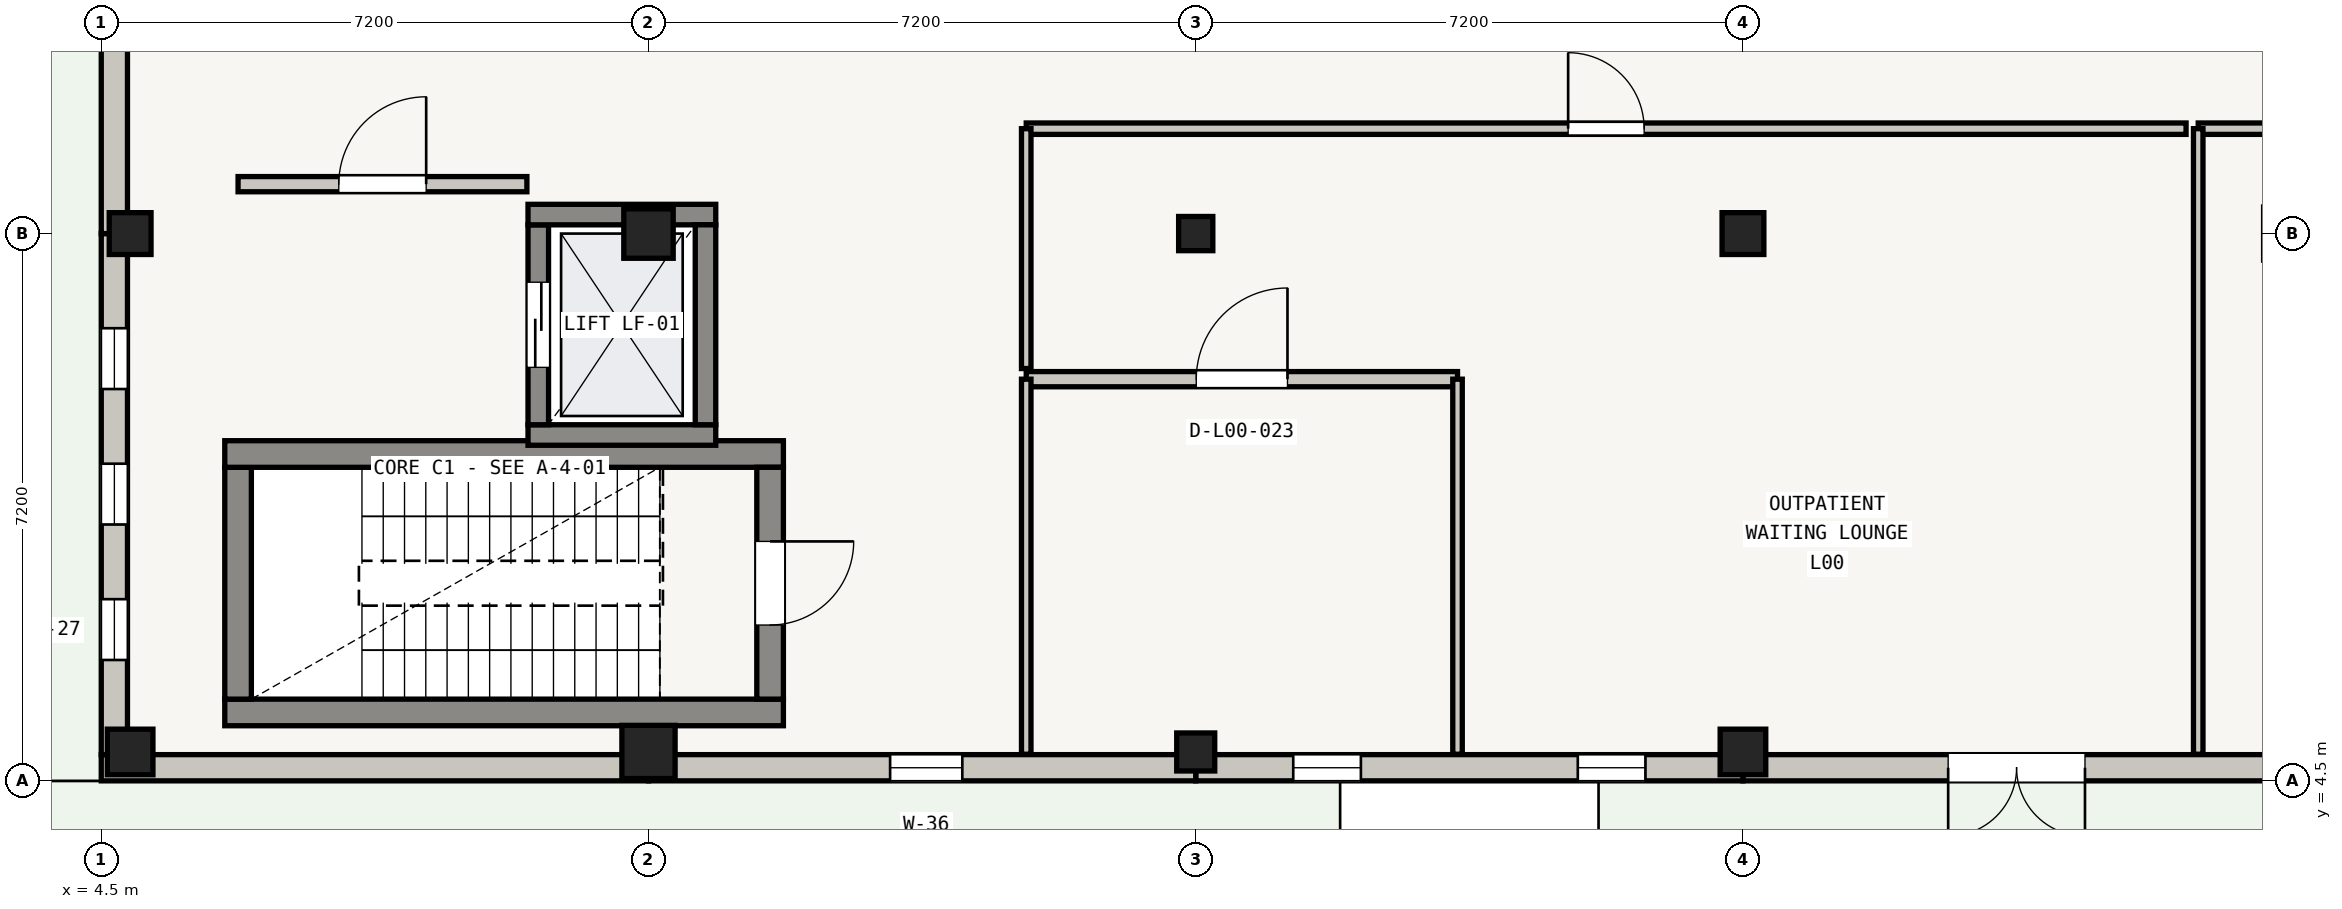
"""IFC4 building model, lengths in metres.
Left out: names, types, materials, properties, quantities, classifications, styles, units other than length and angle.
Written with IfcOpenShell. Run it as: python <this file> out.ifc"""

import sys

from ifc_helpers import new_model, si_unit, direction, frame, frame_2d, origin, origin_2d, place, context, subcontext, project, spatial, rectangle, extrude, element, fill, save


model = new_model("IFC4")
c1 = context("Model", 3, precision=1e-05, world=origin(), true_north=direction((0.0, 1.0)))
c2 = subcontext(c1, "Body", "Model", "MODEL_VIEW")
j1 = project(units=[si_unit("LENGTHUNIT", "METRE"), si_unit("PLANEANGLEUNIT", "RADIAN")], contexts=[c1])
p1 = place(None, origin())
s1 = spatial("IfcSite", under=j1, at=p1, CompositionType="ELEMENT")
p2 = place(p1, origin())
s2 = spatial("IfcBuilding", under=s1, at=p2, CompositionType="ELEMENT")
p3 = place(p2, origin())
s3 = spatial("IfcBuildingStorey", under=s2, at=p3, CompositionType="ELEMENT", Elevation=0.0)
p4 = place(p3, frame((4.88, 4.88, 0.0), z_axis=(0.0, 0.0, 1.0), x_axis=(1.0, 0.0, 0.0)))
e1 = element("IfcColumn", 1, at=p4, inside=s3, PredefinedType="COLUMN", context=c2, shape_type="SweptSolid", body=[
    extrude(rectangle(XDim=0.6, YDim=0.6, at=origin_2d()), origin(), (0.0, 0.0, 1.0), 4.22),
])
p5 = place(p3, frame((4.88, 11.7, 0.0), z_axis=(0.0, 0.0, 1.0), x_axis=(1.0, 0.0, 0.0)))
e2 = element("IfcColumn", 2, at=p5, inside=s3, PredefinedType="COLUMN", context=c2, shape_type="SweptSolid", body=[
    extrude(rectangle(XDim=0.55, YDim=0.55, at=origin_2d()), origin(), (0.0, 0.0, 1.0), 4.22),
])
p6 = place(p3, frame((11.7, 4.88, 0.0), z_axis=(0.0, 0.0, 1.0), x_axis=(1.0, 0.0, 0.0)))
e3 = element("IfcColumn", 3, at=p6, inside=s3, PredefinedType="COLUMN", context=c2, shape_type="SweptSolid", body=[
    extrude(rectangle(XDim=0.7, YDim=0.7, at=origin_2d()), origin(), (0.0, 0.0, 1.0), 4.22),
])
p7 = place(p3, frame((11.7, 11.7, 0.0), z_axis=(0.0, 0.0, 1.0), x_axis=(1.0, 0.0, 0.0)))
e4 = element("IfcColumn", 4, at=p7, inside=s3, PredefinedType="COLUMN", context=c2, shape_type="SweptSolid", body=[
    extrude(rectangle(XDim=0.65, YDim=0.65, at=origin_2d()), origin(), (0.0, 0.0, 1.0), 4.22),
])
p8 = place(p3, frame((18.9, 4.88, 0.0), z_axis=(0.0, 0.0, 1.0), x_axis=(1.0, 0.0, 0.0)))
e5 = element("IfcColumn", 5, at=p8, inside=s3, PredefinedType="COLUMN", context=c2, shape_type="SweptSolid", body=[
    extrude(rectangle(XDim=0.5, YDim=0.5, at=origin_2d()), origin(), (0.0, 0.0, 1.0), 4.22),
])
p9 = place(p3, frame((18.9, 11.7, 0.0), z_axis=(0.0, 0.0, 1.0), x_axis=(1.0, 0.0, 0.0)))
e6 = element("IfcColumn", 6, at=p9, inside=s3, PredefinedType="COLUMN", context=c2, shape_type="SweptSolid", body=[
    extrude(rectangle(XDim=0.45, YDim=0.45, at=origin_2d()), origin(), (0.0, 0.0, 1.0), 4.22),
])
p10 = place(p3, frame((26.1, 4.88, 0.0), z_axis=(0.0, 0.0, 1.0), x_axis=(1.0, 0.0, 0.0)))
e7 = element("IfcColumn", 7, at=p10, inside=s3, PredefinedType="COLUMN", context=c2, shape_type="SweptSolid", body=[
    extrude(rectangle(XDim=0.6, YDim=0.6, at=origin_2d()), origin(), (0.0, 0.0, 1.0), 4.22),
])
p11 = place(p3, frame((26.1, 11.7, 0.0), z_axis=(0.0, 0.0, 1.0), x_axis=(1.0, 0.0, 0.0)))
e8 = element("IfcColumn", 8, at=p11, inside=s3, PredefinedType="COLUMN", context=c2, shape_type="SweptSolid", body=[
    extrude(rectangle(XDim=0.55, YDim=0.55, at=origin_2d()), origin(), (0.0, 0.0, 1.0), 4.22),
])
p12 = place(p3, frame((33.3, 4.673, 0.0), z_axis=(0.0, 0.0, 1.0), x_axis=(-1.0, 0.0, 0.0)))
e9 = element("IfcWall", 9, at=p12, inside=s3, PredefinedType="SOLIDWALL", context=c2, shape_type="SweptSolid", body=[
    extrude(rectangle(XDim=7.2, YDim=0.345, at=frame_2d((3.6, 0.0))), origin(), (0.0, 0.0, 1.0), 3.555),
])
p13 = place(p12, frame((2.7, 0.0, 0.0)))
e10 = element("IfcOpeningElement", 10, at=p13, cuts=e9, PredefinedType="OPENING", context=c2, shape_type="SweptSolid", body=[
    extrude(rectangle(XDim=1.8, YDim=2.1, at=frame_2d((0.9, 1.05))), frame((0.0, 0.172, 0.0), z_axis=(0.0, -1.0, 0.0), x_axis=(1.0, 0.0, 0.0)), (0.0, 0.0, 1.0), 0.345),
])
p14 = place(p3, frame((26.1, 4.673, 0.0), z_axis=(0.0, 0.0, 1.0), x_axis=(-1.0, 0.0, 0.0)))
e11 = element("IfcWall", 11, at=p14, inside=s3, PredefinedType="SOLIDWALL", context=c2, shape_type="SweptSolid", body=[
    extrude(rectangle(XDim=7.2, YDim=0.345, at=frame_2d((3.6, 0.0))), origin(), (0.0, 0.0, 1.0), 3.555),
])
p15 = place(p14, frame((1.283, 0.0, 0.55)))
e12 = element("IfcOpeningElement", 12, at=p15, cuts=e11, PredefinedType="OPENING", context=c2, shape_type="SweptSolid", body=[
    extrude(rectangle(XDim=0.89, YDim=2.02, at=frame_2d((0.445, 1.01))), frame((0.0, 0.172, 0.0), z_axis=(0.0, -1.0, 0.0), x_axis=(1.0, 0.0, 0.0)), (0.0, 0.0, 1.0), 0.345),
])
p16 = place(p14, frame((5.027, 0.0, 0.55)))
e13 = element("IfcOpeningElement", 13, at=p16, cuts=e11, PredefinedType="OPENING", context=c2, shape_type="SweptSolid", body=[
    extrude(rectangle(XDim=0.89, YDim=2.02, at=frame_2d((0.445, 1.01))), frame((0.0, 0.172, 0.0), z_axis=(0.0, -1.0, 0.0), x_axis=(1.0, 0.0, 0.0)), (0.0, 0.0, 1.0), 0.345),
])
p17 = place(p3, frame((18.9, 4.673, 0.0), z_axis=(0.0, 0.0, 1.0), x_axis=(-1.0, 0.0, 0.0)))
e14 = element("IfcWall", 14, at=p17, inside=s3, PredefinedType="SOLIDWALL", context=c2, shape_type="SweptSolid", body=[
    extrude(rectangle(XDim=7.2, YDim=0.345, at=frame_2d((3.6, 0.0))), origin(), (0.0, 0.0, 1.0), 3.555),
])
p18 = place(p17, frame((3.071, 0.0, 0.55)))
e15 = element("IfcOpeningElement", 15, at=p18, cuts=e14, PredefinedType="OPENING", context=c2, shape_type="SweptSolid", body=[
    extrude(rectangle(XDim=0.95, YDim=2.02, at=frame_2d((0.475, 1.01))), frame((0.0, 0.172, 0.0), z_axis=(0.0, -1.0, 0.0), x_axis=(1.0, 0.0, 0.0)), (0.0, 0.0, 1.0), 0.345),
])
p19 = place(p3, frame((11.7, 4.673, 0.0), z_axis=(0.0, 0.0, 1.0), x_axis=(-1.0, 0.0, 0.0)))
e16 = element("IfcWall", 16, at=p19, inside=s3, PredefinedType="SOLIDWALL", context=c2, shape_type="SweptSolid", body=[
    extrude(rectangle(XDim=7.2, YDim=0.345, at=frame_2d((3.6, 0.0))), origin(), (0.0, 0.0, 1.0), 3.655),
])
p20 = place(p3, frame((4.673, 4.845, 0.0), z_axis=(0.0, 0.0, 1.0), x_axis=(0.0, 1.0, 0.0)))
e17 = element("IfcWall", 17, at=p20, inside=s3, PredefinedType="SOLIDWALL", context=c2, shape_type="SweptSolid", body=[
    extrude(rectangle(XDim=6.855, YDim=0.345, at=frame_2d((3.427, 0.0))), origin(), (0.0, 0.0, 1.0), 3.585),
])
p21 = place(p20, frame((1.245, 0.0, 0.55)))
e18 = element("IfcOpeningElement", 18, at=p21, cuts=e17, PredefinedType="OPENING", context=c2, shape_type="SweptSolid", body=[
    extrude(rectangle(XDim=0.8, YDim=1.8, at=frame_2d((0.4, 0.9))), frame((0.0, 0.172, 0.0), z_axis=(0.0, -1.0, 0.0), x_axis=(1.0, 0.0, 0.0)), (0.0, 0.0, 1.0), 0.345),
])
p22 = place(p20, frame((3.028, 0.0, 0.55)))
e19 = element("IfcOpeningElement", 19, at=p22, cuts=e17, PredefinedType="OPENING", context=c2, shape_type="SweptSolid", body=[
    extrude(rectangle(XDim=0.8, YDim=1.8, at=frame_2d((0.4, 0.9))), frame((0.0, 0.172, 0.0), z_axis=(0.0, -1.0, 0.0), x_axis=(1.0, 0.0, 0.0)), (0.0, 0.0, 1.0), 0.345),
])
p23 = place(p20, frame((4.81, 0.0, 0.55)))
e20 = element("IfcOpeningElement", 20, at=p23, cuts=e17, PredefinedType="OPENING", context=c2, shape_type="SweptSolid", body=[
    extrude(rectangle(XDim=0.8, YDim=1.8, at=frame_2d((0.4, 0.9))), frame((0.0, 0.172, 0.0), z_axis=(0.0, -1.0, 0.0), x_axis=(1.0, 0.0, 0.0)), (0.0, 0.0, 1.0), 0.345),
])
p24 = place(p3, frame((4.673, 11.7, 0.0), z_axis=(0.0, 0.0, 1.0), x_axis=(0.0, 1.0, 0.0)))
e21 = element("IfcWall", 21, at=p24, inside=s3, PredefinedType="SOLIDWALL", context=c2, shape_type="SweptSolid", body=[
    extrude(rectangle(XDim=7.2, YDim=0.345, at=frame_2d((3.6, 0.0))), origin(), (0.0, 0.0, 1.0), 3.585),
])
p25 = place(p24, frame((2.7, 0.0, 0.0)))
e22 = element("IfcOpeningElement", 22, at=p25, cuts=e21, PredefinedType="OPENING", context=c2, shape_type="SweptSolid", body=[
    extrude(rectangle(XDim=1.8, YDim=2.1, at=frame_2d((0.9, 1.05))), frame((0.0, 0.172, 0.0), z_axis=(0.0, -1.0, 0.0), x_axis=(1.0, 0.0, 0.0)), (0.0, 0.0, 1.0), 0.345),
])
p26 = place(p3, frame((13.475, 5.4, 0.0), z_axis=(0.0, 0.0, 1.0), x_axis=(-1.0, 0.0, 0.0)))
e23 = element("IfcWall", 23, at=p26, inside=s3, PredefinedType="SHEAR", context=c2, shape_type="SweptSolid", body=[
    extrude(rectangle(XDim=7.35, YDim=0.35, at=frame_2d((3.675, 0.0))), origin(), (0.0, 0.0, 1.0), 4.22),
])
p27 = place(p3, frame((6.3, 5.575, 0.0), z_axis=(0.0, 0.0, 1.0), x_axis=(0.0, 1.0, 0.0)))
e24 = element("IfcWall", 24, at=p27, inside=s3, PredefinedType="SHEAR", context=c2, shape_type="SweptSolid", body=[
    extrude(rectangle(XDim=3.05, YDim=0.35, at=frame_2d((1.525, 0.0))), origin(), (0.0, 0.0, 1.0), 4.22),
])
p28 = place(p3, frame((6.125, 8.8, 0.0), z_axis=(0.0, 0.0, 1.0), x_axis=(1.0, 0.0, 0.0)))
e25 = element("IfcWall", 25, at=p28, inside=s3, PredefinedType="SHEAR", context=c2, shape_type="SweptSolid", body=[
    extrude(rectangle(XDim=7.35, YDim=0.35, at=frame_2d((3.675, 0.0))), origin(), (0.0, 0.0, 1.0), 4.22),
])
p29 = place(p3, frame((13.3, 8.625, 0.0), z_axis=(0.0, 0.0, 1.0), x_axis=(0.0, -1.0, 0.0)))
e26 = element("IfcWall", 26, at=p29, inside=s3, PredefinedType="SHEAR", context=c2, shape_type="SweptSolid", body=[
    extrude(rectangle(XDim=3.05, YDim=0.35, at=frame_2d((1.525, 0.0))), origin(), (0.0, 0.0, 1.0), 4.22),
])
p30 = place(p29, frame((0.975, 0.0, 0.0)))
e27 = element("IfcOpeningElement", 27, at=p30, cuts=e26, PredefinedType="OPENING", context=c2, shape_type="SweptSolid", body=[
    extrude(rectangle(XDim=1.1, YDim=2.05, at=frame_2d((0.55, 1.025))), frame((0.0, 0.175, 0.0), z_axis=(0.0, -1.0, 0.0), x_axis=(1.0, 0.0, 0.0)), (0.0, 0.0, 1.0), 0.35),
])
p31 = place(p3, frame((12.585, 9.05, 0.0), z_axis=(0.0, 0.0, 1.0), x_axis=(-1.0, 0.0, 0.0)))
e28 = element("IfcWall", 28, at=p31, inside=s3, PredefinedType="SHEAR", context=c2, shape_type="SweptSolid", body=[
    extrude(rectangle(XDim=2.47, YDim=0.27, at=frame_2d((1.235, 0.0))), origin(), (0.0, 0.0, 1.0), 4.22),
])
p32 = place(p3, frame((10.25, 9.185, 0.0), z_axis=(0.0, 0.0, 1.0), x_axis=(0.0, 1.0, 0.0)))
e29 = element("IfcWall", 29, at=p32, inside=s3, PredefinedType="SHEAR", context=c2, shape_type="SweptSolid", body=[
    extrude(rectangle(XDim=2.63, YDim=0.27, at=frame_2d((1.315, 0.0))), origin(), (0.0, 0.0, 1.0), 4.22),
])
p33 = place(p32, frame((0.755, 0.0, 0.0)))
e30 = element("IfcOpeningElement", 30, at=p33, cuts=e29, PredefinedType="OPENING", context=c2, shape_type="SweptSolid", body=[
    extrude(rectangle(XDim=1.12, YDim=2.1, at=frame_2d((0.56, 1.05))), frame((0.0, 0.135, 0.0), z_axis=(0.0, -1.0, 0.0), x_axis=(1.0, 0.0, 0.0)), (0.0, 0.0, 1.0), 0.27),
])
p34 = place(p3, frame((10.115, 11.95, 0.0), z_axis=(0.0, 0.0, 1.0), x_axis=(1.0, 0.0, 0.0)))
e31 = element("IfcWall", 31, at=p34, inside=s3, PredefinedType="SHEAR", context=c2, shape_type="SweptSolid", body=[
    extrude(rectangle(XDim=2.47, YDim=0.27, at=frame_2d((1.235, 0.0))), origin(), (0.0, 0.0, 1.0), 4.22),
])
p35 = place(p3, frame((12.45, 11.815, 0.0), z_axis=(0.0, 0.0, 1.0), x_axis=(0.0, -1.0, 0.0)))
e32 = element("IfcWall", 32, at=p35, inside=s3, PredefinedType="SHEAR", context=c2, shape_type="SweptSolid", body=[
    extrude(rectangle(XDim=2.63, YDim=0.27, at=frame_2d((1.315, 0.0))), origin(), (0.0, 0.0, 1.0), 4.22),
])
p36 = place(p3, frame((6.3, 12.35, 0.0), z_axis=(0.0, 0.0, 1.0), x_axis=(1.0, 0.0, 0.0)))
e33 = element("IfcWall", 33, at=p36, inside=s3, PredefinedType="SOLIDWALL", context=c2, shape_type="SweptSolid", body=[
    extrude(rectangle(XDim=3.8, YDim=0.2, at=frame_2d((1.9, 0.0))), origin(), (0.0, 0.0, 1.0), 3.24),
])
p37 = place(p36, frame((1.325, 0.0, 0.0)))
e34 = element("IfcOpeningElement", 34, at=p37, cuts=e33, PredefinedType="OPENING", context=c2, shape_type="SweptSolid", body=[
    extrude(rectangle(XDim=1.15, YDim=2.05, at=frame_2d((0.575, 1.025))), frame((0.0, 0.1, 0.0), z_axis=(0.0, -1.0, 0.0), x_axis=(1.0, 0.0, 0.0)), (0.0, 0.0, 1.0), 0.2),
])
p38 = place(p3, frame((16.67, 9.784, 0.0), z_axis=(0.0, 0.0, 1.0), x_axis=(1.0, 0.0, 0.0)))
e35 = element("IfcWall", 35, at=p38, inside=s3, PredefinedType="SOLIDWALL", context=c2, shape_type="SweptSolid", body=[
    extrude(rectangle(XDim=5.675, YDim=0.2, at=frame_2d((2.837, 0.0))), origin(), (0.0, 0.0, 1.0), 3.24),
])
p39 = place(p38, frame((2.237, 0.0, 0.0)))
e36 = element("IfcOpeningElement", 36, at=p39, cuts=e35, PredefinedType="OPENING", context=c2, shape_type="SweptSolid", body=[
    extrude(rectangle(XDim=1.2, YDim=2.05, at=frame_2d((0.6, 1.025))), frame((0.0, 0.1, 0.0), z_axis=(0.0, -1.0, 0.0), x_axis=(1.0, 0.0, 0.0)), (0.0, 0.0, 1.0), 0.2),
])
for number, where, z_axis, x_axis in (
    (37, (22.344, 9.784, 0.0), (0.0, 0.0, 1.0), (0.0, -1.0, 0.0)),
    (38, (16.67, 4.85, 0.0), (0.0, 0.0, 1.0), (0.0, 1.0, 0.0)),
):
    element("IfcWall", number, at=place(p3, frame(where, z_axis=z_axis, x_axis=x_axis)), inside=s3, PredefinedType="PARTITIONING", context=c2, shape_type="SweptSolid", body=[
        extrude(rectangle(XDim=4.934, YDim=0.125, at=frame_2d((2.467, 0.0))), origin(), (0.0, 0.0, 1.0), 3.24),
    ])
p40 = place(p3, frame((32.09, 13.08, 0.0), z_axis=(0.0, 0.0, 1.0), x_axis=(1.0, 0.0, 0.0)))
e39 = element("IfcWall", 39, at=p40, inside=s3, PredefinedType="PARTITIONING", context=c2, shape_type="SweptSolid", body=[
    extrude(rectangle(XDim=11.036, YDim=0.15, at=frame_2d((5.518, 0.0))), origin(), (0.0, 0.0, 1.0), 3.24),
])
p41 = place(p40, frame((5.018, 0.0, 0.0)))
e40 = element("IfcOpeningElement", 40, at=p41, cuts=e39, PredefinedType="OPENING", context=c2, shape_type="SweptSolid", body=[
    extrude(rectangle(XDim=1.0, YDim=2.05, at=frame_2d((0.5, 1.025))), frame((0.0, 0.075, 0.0), z_axis=(0.0, -1.0, 0.0), x_axis=(1.0, 0.0, 0.0)), (0.0, 0.0, 1.0), 0.15),
])
p42 = place(p3, frame((32.09, 4.85, 0.0), z_axis=(0.0, 0.0, 1.0), x_axis=(0.0, 1.0, 0.0)))
e41 = element("IfcWall", 41, at=p42, inside=s3, PredefinedType="PARTITIONING", context=c2, shape_type="SweptSolid", body=[
    extrude(rectangle(XDim=8.23, YDim=0.125, at=frame_2d((4.115, 0.0))), origin(), (0.0, 0.0, 1.0), 3.24),
])
p43 = place(p3, frame((16.67, 13.08, 0.0), z_axis=(0.0, 0.0, 1.0), x_axis=(1.0, 0.0, 0.0)))
e42 = element("IfcWall", 42, at=p43, inside=s3, PredefinedType="PARTITIONING", context=c2, shape_type="SweptSolid", body=[
    extrude(rectangle(XDim=15.26, YDim=0.15, at=frame_2d((7.63, 0.0))), origin(), (0.0, 0.0, 1.0), 3.24),
])
p44 = place(p43, frame((7.13, 0.0, 0.0)))
e43 = element("IfcOpeningElement", 43, at=p44, cuts=e42, PredefinedType="OPENING", context=c2, shape_type="SweptSolid", body=[
    extrude(rectangle(XDim=1.0, YDim=2.05, at=frame_2d((0.5, 1.025))), frame((0.0, 0.075, 0.0), z_axis=(0.0, -1.0, 0.0), x_axis=(1.0, 0.0, 0.0)), (0.0, 0.0, 1.0), 0.15),
])
p45 = place(p3, frame((16.67, 9.924, 0.0), z_axis=(0.0, 0.0, 1.0), x_axis=(0.0, 1.0, 0.0)))
e44 = element("IfcWall", 44, at=p45, inside=s3, PredefinedType="PARTITIONING", context=c2, shape_type="SweptSolid", body=[
    extrude(rectangle(XDim=3.156, YDim=0.125, at=frame_2d((1.578, 0.0))), origin(), (0.0, 0.0, 1.0), 3.24),
])
p46 = place(p13, origin())
e45 = element("IfcDoor", 45, at=p46, inside=s3, OperationType="DOUBLE_DOOR_SINGLE_SWING", PredefinedType="DOOR", context=c2, shape_type="SweptSolid", body=[
    extrude(rectangle(XDim=1.8, YDim=2.1, at=frame_2d((0.9, 1.05))), frame((0.0, 0.025, 0.0), z_axis=(0.0, -1.0, 0.0), x_axis=(1.0, 0.0, 0.0)), (0.0, 0.0, 1.0), 0.05),
])
fill(e10, e45)
p47 = place(p15, origin())
e46 = element("IfcWindow", 46, at=p47, inside=s3, PartitioningType="DOUBLE_PANEL_VERTICAL", PredefinedType="WINDOW", context=c2, shape_type="SweptSolid", body=[
    extrude(rectangle(XDim=0.89, YDim=2.02, at=frame_2d((0.445, 1.01))), frame((0.0, 0.03, 0.0), z_axis=(0.0, -1.0, 0.0), x_axis=(1.0, 0.0, 0.0)), (0.0, 0.0, 1.0), 0.06),
])
fill(e12, e46)
p48 = place(p16, origin())
e47 = element("IfcWindow", 47, at=p48, inside=s3, PartitioningType="DOUBLE_PANEL_VERTICAL", PredefinedType="WINDOW", context=c2, shape_type="SweptSolid", body=[
    extrude(rectangle(XDim=0.89, YDim=2.02, at=frame_2d((0.445, 1.01))), frame((0.0, 0.03, 0.0), z_axis=(0.0, -1.0, 0.0), x_axis=(1.0, 0.0, 0.0)), (0.0, 0.0, 1.0), 0.06),
])
fill(e13, e47)
p49 = place(p18, origin())
e48 = element("IfcWindow", 48, at=p49, inside=s3, PartitioningType="DOUBLE_PANEL_VERTICAL", PredefinedType="WINDOW", context=c2, shape_type="SweptSolid", body=[
    extrude(rectangle(XDim=0.95, YDim=2.02, at=frame_2d((0.475, 1.01))), frame((0.0, 0.03, 0.0), z_axis=(0.0, -1.0, 0.0), x_axis=(1.0, 0.0, 0.0)), (0.0, 0.0, 1.0), 0.06),
])
fill(e15, e48)
p50 = place(p21, origin())
e49 = element("IfcWindow", 49, at=p50, inside=s3, PartitioningType="SINGLE_PANEL", PredefinedType="WINDOW", context=c2, shape_type="SweptSolid", body=[
    extrude(rectangle(XDim=0.8, YDim=1.8, at=frame_2d((0.4, 0.9))), frame((0.0, 0.03, 0.0), z_axis=(0.0, -1.0, 0.0), x_axis=(1.0, 0.0, 0.0)), (0.0, 0.0, 1.0), 0.06),
])
fill(e18, e49)
p51 = place(p22, origin())
e50 = element("IfcWindow", 50, at=p51, inside=s3, PartitioningType="SINGLE_PANEL", PredefinedType="WINDOW", context=c2, shape_type="SweptSolid", body=[
    extrude(rectangle(XDim=0.8, YDim=1.8, at=frame_2d((0.4, 0.9))), frame((0.0, 0.03, 0.0), z_axis=(0.0, -1.0, 0.0), x_axis=(1.0, 0.0, 0.0)), (0.0, 0.0, 1.0), 0.06),
])
fill(e19, e50)
p52 = place(p23, origin())
e51 = element("IfcWindow", 51, at=p52, inside=s3, PartitioningType="SINGLE_PANEL", PredefinedType="WINDOW", context=c2, shape_type="SweptSolid", body=[
    extrude(rectangle(XDim=0.8, YDim=1.8, at=frame_2d((0.4, 0.9))), frame((0.0, 0.03, 0.0), z_axis=(0.0, -1.0, 0.0), x_axis=(1.0, 0.0, 0.0)), (0.0, 0.0, 1.0), 0.06),
])
fill(e20, e51)
p53 = place(p30, origin())
e52 = element("IfcDoor", 52, at=p53, inside=s3, OperationType="SINGLE_SWING_LEFT", PredefinedType="DOOR", context=c2, shape_type="SweptSolid", body=[
    extrude(rectangle(XDim=1.1, YDim=2.05, at=frame_2d((0.55, 1.025))), frame((0.0, 0.025, 0.0), z_axis=(0.0, -1.0, 0.0), x_axis=(1.0, 0.0, 0.0)), (0.0, 0.0, 1.0), 0.05),
])
fill(e27, e52)
p54 = place(p33, origin())
e53 = element("IfcDoor", 53, at=p54, inside=s3, OperationType="DOUBLE_DOOR_SLIDING", PredefinedType="DOOR", context=c2, shape_type="SweptSolid", body=[
    extrude(rectangle(XDim=1.12, YDim=2.1, at=frame_2d((0.56, 1.05))), frame((0.0, 0.025, 0.0), z_axis=(0.0, -1.0, 0.0), x_axis=(1.0, 0.0, 0.0)), (0.0, 0.0, 1.0), 0.05),
])
fill(e30, e53)
p55 = place(p37, origin())
e54 = element("IfcDoor", 54, at=p55, inside=s3, OperationType="SINGLE_SWING_RIGHT", PredefinedType="DOOR", context=c2, shape_type="SweptSolid", body=[
    extrude(rectangle(XDim=1.15, YDim=2.05, at=frame_2d((0.575, 1.025))), frame((0.0, 0.025, 0.0), z_axis=(0.0, -1.0, 0.0), x_axis=(1.0, 0.0, 0.0)), (0.0, 0.0, 1.0), 0.05),
])
fill(e34, e54)
p56 = place(p39, origin())
e55 = element("IfcDoor", 55, at=p56, inside=s3, OperationType="SINGLE_SWING_RIGHT", PredefinedType="DOOR", context=c2, shape_type="SweptSolid", body=[
    extrude(rectangle(XDim=1.2, YDim=2.05, at=frame_2d((0.6, 1.025))), frame((0.0, 0.025, 0.0), z_axis=(0.0, -1.0, 0.0), x_axis=(1.0, 0.0, 0.0)), (0.0, 0.0, 1.0), 0.05),
])
fill(e36, e55)
p57 = place(p44, origin())
e56 = element("IfcDoor", 56, at=p57, inside=s3, OperationType="SINGLE_SWING_LEFT", PredefinedType="DOOR", context=c2, shape_type="SweptSolid", body=[
    extrude(rectangle(XDim=1.0, YDim=2.05, at=frame_2d((0.5, 1.025))), frame((0.0, 0.025, 0.0), z_axis=(0.0, -1.0, 0.0), x_axis=(1.0, 0.0, 0.0)), (0.0, 0.0, 1.0), 0.05),
])
fill(e43, e56)
save(model, sys.argv[1])
